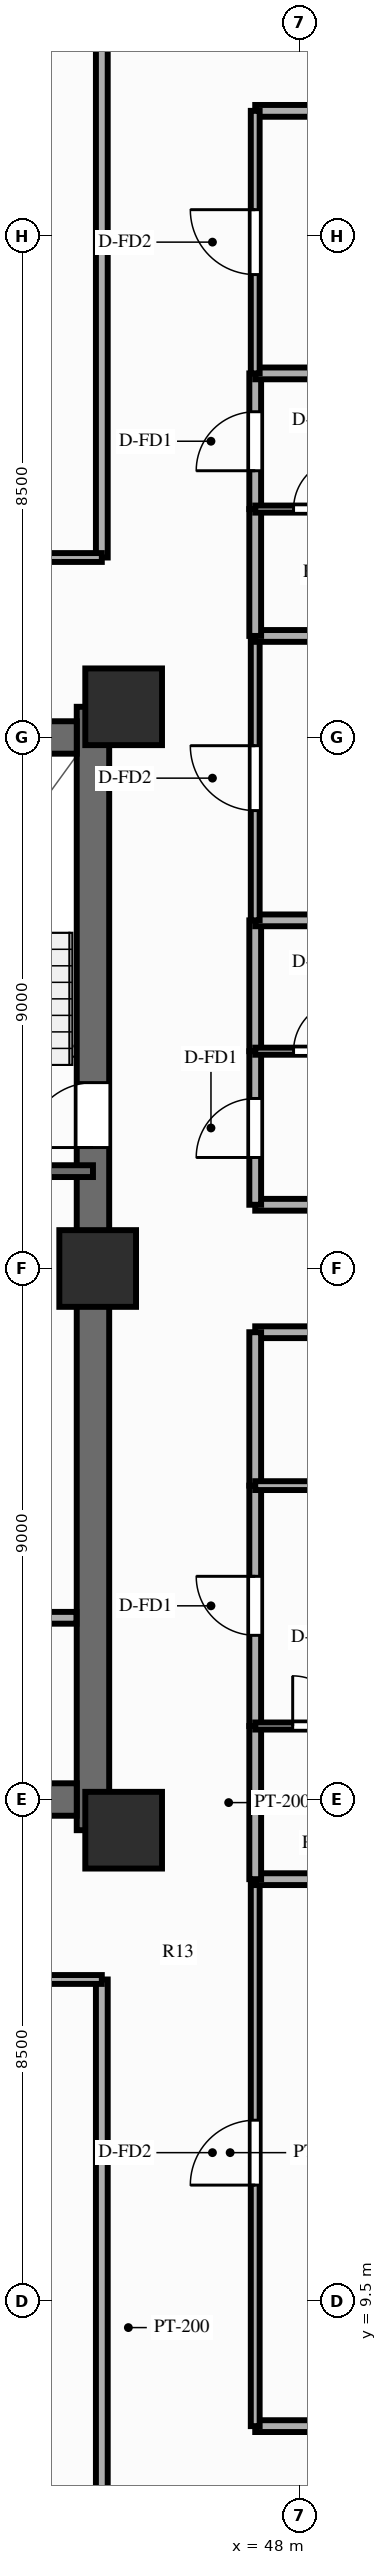
"""IFC4 building model, lengths in metres.
Left out: names, types, materials, properties, quantities, classifications, styles, units other than length and angle.
Written with IfcOpenShell. Run it as: python <this file> out.ifc"""

import sys

from ifc_helpers import new_model, si_unit, direction, frame, frame_2d, origin, origin_2d, place, context, subcontext, project, spatial, rectangle, extrude, source, transform, mapped, element, fill, save


model = new_model("IFC4")
c1 = context("Model", 3, precision=1e-05, world=origin(), true_north=direction((0.0, 1.0)))
c2 = subcontext(c1, "Body", "Model", "MODEL_VIEW")
j1 = project(units=[si_unit("LENGTHUNIT", "METRE"), si_unit("PLANEANGLEUNIT", "RADIAN")], contexts=[c1])
p1 = place(None, origin())
s1 = spatial("IfcSite", under=j1, at=p1, CompositionType="ELEMENT")
p2 = place(p1, origin())
s2 = spatial("IfcBuilding", under=s1, at=p2, CompositionType="ELEMENT")
p3 = place(p2, frame((0.0, 0.0, 126.75)))
s3 = spatial("IfcBuildingStorey", under=s2, at=p3, CompositionType="ELEMENT", Elevation=126.75)
p4 = place(p3, frame((44.5, 17.48, 0.0), z_axis=(0.0, 0.0, 1.0), x_axis=(0.0, 1.0, 0.0)))
e1 = element("IfcWall", 1, at=p4, inside=s3, PredefinedType="SHEAR", context=c2, shape_type="SweptSolid", body=[
    extrude(rectangle(XDim=19.04, YDim=0.55, at=frame_2d((9.52, 0.0))), origin(), (0.0, 0.0, 1.0), 3.0),
])
p5 = place(p4, frame((12.67, 0.0, 0.0), z_axis=(0.0, 0.0, 1.0), x_axis=(-1.0, 0.0, 0.0)))
e2 = element("IfcOpeningElement", 2, at=p5, cuts=e1, PredefinedType="OPENING", context=c2, shape_type="SweptSolid", body=[
    extrude(rectangle(XDim=1.1, YDim=2.15, at=frame_2d((0.55, 1.075))), frame((0.0, 0.287, 0.0), z_axis=(0.0, -1.0, 0.0), x_axis=(1.0, 0.0, 0.0)), (0.0, 0.0, 1.0), 0.574),
])
p6 = place(p3, frame((31.775, 18.0, 0.0), z_axis=(0.0, 0.0, 1.0), x_axis=(1.0, 0.0, 0.0)))
e3 = element("IfcWall", 3, at=p6, inside=s3, PredefinedType="SHEAR", context=c2, shape_type="SweptSolid", body=[
    extrude(rectangle(XDim=12.45, YDim=0.55, at=frame_2d((6.225, 0.0))), origin(), (0.0, 0.0, 1.0), 3.0),
])
p7 = place(p3, frame((31.775, 36.0, 0.0), z_axis=(0.0, 0.0, 1.0), x_axis=(1.0, 0.0, 0.0)))
e4 = element("IfcWall", 4, at=p7, inside=s3, PredefinedType="SHEAR", context=c2, shape_type="SweptSolid", body=[
    extrude(rectangle(XDim=12.45, YDim=0.55, at=frame_2d((6.225, 0.0))), origin(), (0.0, 0.0, 1.0), 3.0),
])
p8 = place(p7, frame((5.175, 0.0, 0.0), z_axis=(0.0, 0.0, 1.0), x_axis=(-1.0, 0.0, 0.0)))
e5 = element("IfcOpeningElement", 5, at=p8, cuts=e4, PredefinedType="OPENING", context=c2, shape_type="SweptSolid", body=[
    extrude(rectangle(XDim=1.4, YDim=2.15, at=frame_2d((0.7, 1.075))), frame((0.0, 0.287, 0.0), z_axis=(0.0, -1.0, 0.0), x_axis=(1.0, 0.0, 0.0)), (0.0, 0.0, 1.0), 0.574),
])
m1 = source(origin(), c2, "Body", "SweptSolid", [
    extrude(rectangle(XDim=1.3, YDim=1.3, at=origin_2d()), origin(), (0.0, 0.0, 1.0), 3.0),
])
for number, where, z_axis, x_axis in (
    (6, (45.02, 17.48, 0.0), (0.0, 0.0, 1.0), (1.0, 0.0, 0.0)),
    (7, (45.02, 36.52, 0.0), (0.0, 0.0, 1.0), (1.0, 0.0, 0.0)),
    (8, (44.58, 27.0, 0.0), (0.0, 0.0, 1.0), (1.0, 0.0, 0.0)),
):
    element("IfcColumn", number, at=place(p3, frame(where, z_axis=z_axis, x_axis=x_axis)), inside=s3, PredefinedType="COLUMN", context=c2, shape_type="MappedRepresentation", body=[
        mapped(m1, transform((0.0, 0.0, 0.0), scale=1.0)),
    ])
p9 = place(p3, frame((42.88, 21.08, 0.0), z_axis=(0.0, 0.0, 1.0), x_axis=(1.0, 0.0, 0.0)))
e9 = element("IfcWall", 9, at=p9, inside=s3, PredefinedType="PARTITIONING", context=c2, shape_type="SweptSolid", body=[
    extrude(rectangle(XDim=1.34, YDim=0.2, at=frame_2d((0.67, 0.0))), origin(), (0.0, 0.0, 1.0), 2.79),
])
p10 = place(p3, frame((40.57, 28.65, 0.0), z_axis=(0.0, 0.0, 1.0), x_axis=(1.0, 0.0, 0.0)))
e10 = element("IfcWall", 10, at=p10, inside=s3, PredefinedType="SOLIDWALL", context=c2, shape_type="SweptSolid", body=[
    extrude(rectangle(XDim=3.93, YDim=0.2, at=frame_2d((1.965, 0.0))), origin(), (0.0, 0.0, 1.0), 2.79),
])
p11 = place(p3, frame((44.65, 14.95, 0.0), z_axis=(0.0, 0.0, 1.0), x_axis=(0.0, -1.0, 0.0)))
e11 = element("IfcWall", 11, at=p11, inside=s3, PredefinedType="PARTITIONING", context=c2, shape_type="SweptSolid", body=[
    extrude(rectangle(XDim=11.8, YDim=0.2, at=frame_2d((5.9, 0.0))), origin(), (0.0, 0.0, 1.0), 2.34),
])
p12 = place(p3, frame((36.25, 14.95, 0.0), z_axis=(0.0, 0.0, 1.0), x_axis=(1.0, 0.0, 0.0)))
e12 = element("IfcWall", 12, at=p12, inside=s3, PredefinedType="PARTITIONING", context=c2, shape_type="SweptSolid", body=[
    extrude(rectangle(XDim=8.4, YDim=0.15, at=frame_2d((4.2, 0.0))), origin(), (0.0, 0.0, 1.0), 2.79),
])
p13 = place(p12, frame((3.367, 0.0, 0.0)))
e13 = element("IfcOpeningElement", 13, at=p13, cuts=e12, PredefinedType="OPENING", context=c2, shape_type="SweptSolid", body=[
    extrude(rectangle(XDim=1.1, YDim=2.15, at=frame_2d((0.55, 1.075))), frame((0.0, 0.087, 0.0), z_axis=(0.0, -1.0, 0.0), x_axis=(1.0, 0.0, 0.0)), (0.0, 0.0, 1.0), 0.174),
])
p14 = place(p3, frame((44.65, 39.05, 0.0), z_axis=(0.0, 0.0, 1.0), x_axis=(0.0, 1.0, 0.0)))
e14 = element("IfcWall", 14, at=p14, inside=s3, PredefinedType="PARTITIONING", context=c2, shape_type="SweptSolid", body=[
    extrude(rectangle(XDim=11.8, YDim=0.2, at=frame_2d((5.9, 0.0))), origin(), (0.0, 0.0, 1.0), 2.34),
])
p15 = place(p3, frame((38.4, 39.05, 0.0), z_axis=(0.0, 0.0, 1.0), x_axis=(1.0, 0.0, 0.0)))
e15 = element("IfcWall", 15, at=p15, inside=s3, PredefinedType="PARTITIONING", context=c2, shape_type="SweptSolid", body=[
    extrude(rectangle(XDim=6.25, YDim=0.15, at=frame_2d((3.125, 0.0))), origin(), (0.0, 0.0, 1.0), 2.79),
])
p16 = place(p15, frame((2.382, 0.0, 0.0)))
e16 = element("IfcOpeningElement", 16, at=p16, cuts=e15, PredefinedType="OPENING", context=c2, shape_type="SweptSolid", body=[
    extrude(rectangle(XDim=1.1, YDim=2.15, at=frame_2d((0.55, 1.075))), frame((0.0, 0.087, 0.0), z_axis=(0.0, -1.0, 0.0), x_axis=(1.0, 0.0, 0.0)), (0.0, 0.0, 1.0), 0.174),
])
for number, where, z_axis, x_axis in (
    (17, (47.25, 7.38, 0.0), (0.0, 0.0, 1.0), (1.0, 0.0, 0.0)),
    (18, (47.25, 25.92, 0.0), (0.0, 0.0, 1.0), (1.0, 0.0, 0.0)),
):
    element("IfcWall", number, at=place(p3, frame(where, z_axis=z_axis, x_axis=x_axis)), inside=s3, PredefinedType="PARTITIONING", context=c2, shape_type="SweptSolid", body=[
        extrude(rectangle(XDim=16.6, YDim=0.2, at=frame_2d((8.3, 0.0))), origin(), (0.0, 0.0, 1.0), 2.79),
    ])
p17 = place(p3, frame((47.25, 7.38, 0.0), z_axis=(0.0, 0.0, 1.0), x_axis=(0.0, 1.0, 0.0)))
e19 = element("IfcWall", 19, at=p17, inside=s3, PredefinedType="PARTITIONING", context=c2, shape_type="SweptSolid", body=[
    extrude(rectangle(XDim=9.27, YDim=0.15, at=frame_2d((4.635, 0.0))), origin(), (0.0, 0.0, 1.0), 2.79),
])
p18 = place(p17, frame((4.085, 0.0, 0.0)))
e20 = element("IfcOpeningElement", 20, at=p18, cuts=e19, PredefinedType="OPENING", context=c2, shape_type="SweptSolid", body=[
    extrude(rectangle(XDim=1.1, YDim=2.15, at=frame_2d((0.55, 1.075))), frame((0.0, 0.087, 0.0), z_axis=(0.0, -1.0, 0.0), x_axis=(1.0, 0.0, 0.0)), (0.0, 0.0, 1.0), 0.174),
])
p19 = place(p3, frame((47.25, 16.65, 0.0), z_axis=(0.0, 0.0, 1.0), x_axis=(1.0, 0.0, 0.0)))
e21 = element("IfcWall", 21, at=p19, inside=s3, PredefinedType="PARTITIONING", context=c2, shape_type="SweptSolid", body=[
    extrude(rectangle(XDim=16.6, YDim=0.2, at=frame_2d((8.3, 0.0))), origin(), (0.0, 0.0, 1.0), 2.79),
])
p20 = place(p3, frame((47.25, 16.65, 0.0), z_axis=(0.0, 0.0, 1.0), x_axis=(0.0, 1.0, 0.0)))
e22 = element("IfcWall", 22, at=p20, inside=s3, PredefinedType="PARTITIONING", context=c2, shape_type="SweptSolid", body=[
    extrude(rectangle(XDim=2.596, YDim=0.2, at=frame_2d((1.298, 0.0))), origin(), (0.0, 0.0, 1.0), 2.79),
])
p21 = place(p3, frame((47.25, 19.246, 0.0), z_axis=(0.0, 0.0, 1.0), x_axis=(0.0, 1.0, 0.0)))
e23 = element("IfcWall", 23, at=p21, inside=s3, PredefinedType="PARTITIONING", context=c2, shape_type="SweptSolid", body=[
    extrude(rectangle(XDim=4.074, YDim=0.2, at=frame_2d((2.037, 0.0))), origin(), (0.0, 0.0, 1.0), 2.79),
])
p22 = place(p21, frame((1.537, 0.0, 0.0)))
e24 = element("IfcOpeningElement", 24, at=p22, cuts=e23, PredefinedType="OPENING", context=c2, shape_type="SweptSolid", body=[
    extrude(rectangle(XDim=1.0, YDim=2.15, at=frame_2d((0.5, 1.075))), frame((0.0, 0.112, 0.0), z_axis=(0.0, -1.0, 0.0), x_axis=(1.0, 0.0, 0.0)), (0.0, 0.0, 1.0), 0.224),
])
p23 = place(p3, frame((47.25, 23.32, 0.0), z_axis=(0.0, 0.0, 1.0), x_axis=(0.0, 1.0, 0.0)))
e25 = element("IfcWall", 25, at=p23, inside=s3, PredefinedType="PARTITIONING", context=c2, shape_type="SweptSolid", body=[
    extrude(rectangle(XDim=2.6, YDim=0.2, at=frame_2d((1.3, 0.0))), origin(), (0.0, 0.0, 1.0), 2.79),
])
p24 = place(p3, frame((47.25, 19.246, 0.0), z_axis=(0.0, 0.0, 1.0), x_axis=(1.0, 0.0, 0.0)))
e26 = element("IfcWall", 26, at=p24, inside=s3, PredefinedType="PARTITIONING", context=c2, shape_type="SweptSolid", body=[
    extrude(rectangle(XDim=2.12, YDim=0.12, at=frame_2d((1.06, 0.0))), origin(), (0.0, 0.0, 1.0), 2.79),
])
p25 = place(p24, frame((0.635, 0.0, 0.0)))
e27 = element("IfcOpeningElement", 27, at=p25, cuts=e26, PredefinedType="OPENING", context=c2, shape_type="SweptSolid", body=[
    extrude(rectangle(XDim=0.85, YDim=2.05, at=frame_2d((0.425, 1.025))), frame((0.0, 0.072, 0.0), z_axis=(0.0, -1.0, 0.0), x_axis=(1.0, 0.0, 0.0)), (0.0, 0.0, 1.0), 0.144),
])
p26 = place(p3, frame((47.25, 23.32, 0.0), z_axis=(0.0, 0.0, 1.0), x_axis=(1.0, 0.0, 0.0)))
e28 = element("IfcWall", 28, at=p26, inside=s3, PredefinedType="PARTITIONING", context=c2, shape_type="SweptSolid", body=[
    extrude(rectangle(XDim=3.0, YDim=0.15, at=frame_2d((1.5, 0.0))), origin(), (0.0, 0.0, 1.0), 2.79),
])
p27 = place(p26, frame((1.05, 0.0, 0.0)))
e29 = element("IfcOpeningElement", 29, at=p27, cuts=e28, PredefinedType="OPENING", context=c2, shape_type="SweptSolid", body=[
    extrude(rectangle(XDim=0.9, YDim=2.1, at=frame_2d((0.45, 1.05))), frame((0.0, 0.087, 0.0), z_axis=(0.0, -1.0, 0.0), x_axis=(1.0, 0.0, 0.0)), (0.0, 0.0, 1.0), 0.174),
])
for number, where, z_axis, x_axis in (
    (30, (47.25, 28.08, 0.0), (0.0, 0.0, 1.0), (1.0, 0.0, 0.0)),
    (31, (47.25, 46.62, 0.0), (0.0, 0.0, 1.0), (1.0, 0.0, 0.0)),
):
    element("IfcWall", number, at=place(p3, frame(where, z_axis=z_axis, x_axis=x_axis)), inside=s3, PredefinedType="PARTITIONING", context=c2, shape_type="SweptSolid", body=[
        extrude(rectangle(XDim=16.6, YDim=0.2, at=frame_2d((8.3, 0.0))), origin(), (0.0, 0.0, 1.0), 2.79),
    ])
p28 = place(p3, frame((47.25, 28.08, 0.0), z_axis=(0.0, 0.0, 1.0), x_axis=(0.0, 1.0, 0.0)))
e32 = element("IfcWall", 32, at=p28, inside=s3, PredefinedType="PARTITIONING", context=c2, shape_type="SweptSolid", body=[
    extrude(rectangle(XDim=2.603, YDim=0.2, at=frame_2d((1.302, 0.0))), origin(), (0.0, 0.0, 1.0), 2.79),
])
p29 = place(p28, frame((0.802, 0.0, 0.0)))
e33 = element("IfcOpeningElement", 33, at=p29, cuts=e32, PredefinedType="OPENING", context=c2, shape_type="SweptSolid", body=[
    extrude(rectangle(XDim=1.0, YDim=2.15, at=frame_2d((0.5, 1.075))), frame((0.0, 0.112, 0.0), z_axis=(0.0, -1.0, 0.0), x_axis=(1.0, 0.0, 0.0)), (0.0, 0.0, 1.0), 0.224),
])
p30 = place(p3, frame((47.25, 30.683, 0.0), z_axis=(0.0, 0.0, 1.0), x_axis=(0.0, 1.0, 0.0)))
e34 = element("IfcWall", 34, at=p30, inside=s3, PredefinedType="PARTITIONING", context=c2, shape_type="SweptSolid", body=[
    extrude(rectangle(XDim=2.217, YDim=0.2, at=frame_2d((1.109, 0.0))), origin(), (0.0, 0.0, 1.0), 2.79),
])
p31 = place(p3, frame((47.25, 30.683, 0.0), z_axis=(0.0, 0.0, 1.0), x_axis=(1.0, 0.0, 0.0)))
e35 = element("IfcWall", 35, at=p31, inside=s3, PredefinedType="PARTITIONING", context=c2, shape_type="SweptSolid", body=[
    extrude(rectangle(XDim=2.15, YDim=0.12, at=frame_2d((1.075, 0.0))), origin(), (0.0, 0.0, 1.0), 2.79),
])
p32 = place(p31, frame((0.65, 0.0, 0.0)))
e36 = element("IfcOpeningElement", 36, at=p32, cuts=e35, PredefinedType="OPENING", context=c2, shape_type="SweptSolid", body=[
    extrude(rectangle(XDim=0.85, YDim=2.05, at=frame_2d((0.425, 1.025))), frame((0.0, 0.072, 0.0), z_axis=(0.0, -1.0, 0.0), x_axis=(1.0, 0.0, 0.0)), (0.0, 0.0, 1.0), 0.144),
])
p33 = place(p3, frame((47.25, 32.9, 0.0), z_axis=(0.0, 0.0, 1.0), x_axis=(1.0, 0.0, 0.0)))
e37 = element("IfcWall", 37, at=p33, inside=s3, PredefinedType="PARTITIONING", context=c2, shape_type="SweptSolid", body=[
    extrude(rectangle(XDim=16.6, YDim=0.2, at=frame_2d((8.3, 0.0))), origin(), (0.0, 0.0, 1.0), 2.79),
])
p34 = place(p3, frame((47.25, 32.9, 0.0), z_axis=(0.0, 0.0, 1.0), x_axis=(0.0, 1.0, 0.0)))
e38 = element("IfcWall", 38, at=p34, inside=s3, PredefinedType="PARTITIONING", context=c2, shape_type="SweptSolid", body=[
    extrude(rectangle(XDim=4.82, YDim=0.15, at=frame_2d((2.41, 0.0))), origin(), (0.0, 0.0, 1.0), 2.79),
])
p35 = place(p34, frame((1.86, 0.0, 0.0)))
e39 = element("IfcOpeningElement", 39, at=p35, cuts=e38, PredefinedType="OPENING", context=c2, shape_type="SweptSolid", body=[
    extrude(rectangle(XDim=1.1, YDim=2.15, at=frame_2d((0.55, 1.075))), frame((0.0, 0.087, 0.0), z_axis=(0.0, -1.0, 0.0), x_axis=(1.0, 0.0, 0.0)), (0.0, 0.0, 1.0), 0.174),
])
p36 = place(p3, frame((47.25, 37.721, 0.0), z_axis=(0.0, 0.0, 1.0), x_axis=(1.0, 0.0, 0.0)))
e40 = element("IfcWall", 40, at=p36, inside=s3, PredefinedType="PARTITIONING", context=c2, shape_type="SweptSolid", body=[
    extrude(rectangle(XDim=16.6, YDim=0.2, at=frame_2d((8.3, 0.0))), origin(), (0.0, 0.0, 1.0), 2.79),
])
p37 = place(p3, frame((47.25, 37.721, 0.0), z_axis=(0.0, 0.0, 1.0), x_axis=(0.0, 1.0, 0.0)))
e41 = element("IfcWall", 41, at=p37, inside=s3, PredefinedType="PARTITIONING", context=c2, shape_type="SweptSolid", body=[
    extrude(rectangle(XDim=2.15, YDim=0.2, at=frame_2d((1.075, 0.0))), origin(), (0.0, 0.0, 1.0), 2.79),
])
p38 = place(p3, frame((47.25, 39.871, 0.0), z_axis=(0.0, 0.0, 1.0), x_axis=(0.0, 1.0, 0.0)))
e42 = element("IfcWall", 42, at=p38, inside=s3, PredefinedType="PARTITIONING", context=c2, shape_type="SweptSolid", body=[
    extrude(rectangle(XDim=2.3, YDim=0.2, at=frame_2d((1.15, 0.0))), origin(), (0.0, 0.0, 1.0), 2.79),
])
p39 = place(p38, frame((0.65, 0.0, 0.0)))
e43 = element("IfcOpeningElement", 43, at=p39, cuts=e42, PredefinedType="OPENING", context=c2, shape_type="SweptSolid", body=[
    extrude(rectangle(XDim=1.0, YDim=2.15, at=frame_2d((0.5, 1.075))), frame((0.0, 0.112, 0.0), z_axis=(0.0, -1.0, 0.0), x_axis=(1.0, 0.0, 0.0)), (0.0, 0.0, 1.0), 0.224),
])
p40 = place(p3, frame((47.25, 39.871, 0.0), z_axis=(0.0, 0.0, 1.0), x_axis=(1.0, 0.0, 0.0)))
e44 = element("IfcWall", 44, at=p40, inside=s3, PredefinedType="PARTITIONING", context=c2, shape_type="SweptSolid", body=[
    extrude(rectangle(XDim=2.15, YDim=0.12, at=frame_2d((1.075, 0.0))), origin(), (0.0, 0.0, 1.0), 2.79),
])
p41 = place(p40, frame((0.65, 0.0, 0.0)))
e45 = element("IfcOpeningElement", 45, at=p41, cuts=e44, PredefinedType="OPENING", context=c2, shape_type="SweptSolid", body=[
    extrude(rectangle(XDim=0.85, YDim=2.05, at=frame_2d((0.425, 1.025))), frame((0.0, 0.072, 0.0), z_axis=(0.0, -1.0, 0.0), x_axis=(1.0, 0.0, 0.0)), (0.0, 0.0, 1.0), 0.144),
])
p42 = place(p3, frame((47.25, 42.17, 0.0), z_axis=(0.0, 0.0, 1.0), x_axis=(1.0, 0.0, 0.0)))
e46 = element("IfcWall", 46, at=p42, inside=s3, PredefinedType="PARTITIONING", context=c2, shape_type="SweptSolid", body=[
    extrude(rectangle(XDim=16.6, YDim=0.2, at=frame_2d((8.3, 0.0))), origin(), (0.0, 0.0, 1.0), 2.79),
])
p43 = place(p3, frame((47.25, 42.17, 0.0), z_axis=(0.0, 0.0, 1.0), x_axis=(0.0, 1.0, 0.0)))
e47 = element("IfcWall", 47, at=p43, inside=s3, PredefinedType="PARTITIONING", context=c2, shape_type="SweptSolid", body=[
    extrude(rectangle(XDim=4.45, YDim=0.15, at=frame_2d((2.225, 0.0))), origin(), (0.0, 0.0, 1.0), 2.79),
])
p44 = place(p43, frame((1.675, 0.0, 0.0)))
e48 = element("IfcOpeningElement", 48, at=p44, cuts=e47, PredefinedType="OPENING", context=c2, shape_type="SweptSolid", body=[
    extrude(rectangle(XDim=1.1, YDim=2.15, at=frame_2d((0.55, 1.075))), frame((0.0, 0.087, 0.0), z_axis=(0.0, -1.0, 0.0), x_axis=(1.0, 0.0, 0.0)), (0.0, 0.0, 1.0), 0.174),
])
m2 = source(origin(), c2, "Body", "SweptSolid", [
    extrude(rectangle(XDim=1.1, YDim=2.15, at=frame_2d((0.55, 1.075))), frame((0.0, 0.025, 0.0), z_axis=(0.0, -1.0, 0.0), x_axis=(1.0, 0.0, 0.0)), (0.0, 0.0, 1.0), 0.05),
])
p45 = place(p5, origin())
e49 = element("IfcDoor", 49, at=p45, inside=s3, OperationType="SINGLE_SWING_RIGHT", PredefinedType="DOOR", context=c2, shape_type="MappedRepresentation", body=[
    mapped(m2, transform((0.0, 0.0, 0.0), scale=1.0)),
])
fill(e2, e49)
p46 = place(p18, origin())
e50 = element("IfcDoor", 50, at=p46, inside=s3, OperationType="SINGLE_SWING_LEFT", PredefinedType="DOOR", context=c2, shape_type="MappedRepresentation", body=[
    mapped(m2, transform((0.0, 0.0, 0.0), scale=1.0)),
])
fill(e20, e50)
m3 = source(origin(), c2, "Body", "SweptSolid", [
    extrude(rectangle(XDim=1.0, YDim=2.15, at=frame_2d((0.5, 1.075))), frame((0.0, 0.025, 0.0), z_axis=(0.0, -1.0, 0.0), x_axis=(1.0, 0.0, 0.0)), (0.0, 0.0, 1.0), 0.05),
])
p47 = place(p22, origin())
e51 = element("IfcDoor", 51, at=p47, inside=s3, OperationType="SINGLE_SWING_RIGHT", PredefinedType="DOOR", context=c2, shape_type="MappedRepresentation", body=[
    mapped(m3, transform((0.0, 0.0, 0.0), scale=1.0)),
])
fill(e24, e51)
m4 = source(origin(), c2, "Body", "SweptSolid", [
    extrude(rectangle(XDim=0.85, YDim=2.05, at=frame_2d((0.425, 1.025))), frame((0.0, 0.025, 0.0), z_axis=(0.0, -1.0, 0.0), x_axis=(1.0, 0.0, 0.0)), (0.0, 0.0, 1.0), 0.05),
])
p48 = place(p25, origin())
e52 = element("IfcDoor", 52, at=p48, inside=s3, OperationType="SINGLE_SWING_LEFT", PredefinedType="DOOR", context=c2, shape_type="MappedRepresentation", body=[
    mapped(m4, transform((0.0, 0.0, 0.0), scale=1.0)),
])
fill(e27, e52)
p49 = place(p29, origin())
e53 = element("IfcDoor", 53, at=p49, inside=s3, OperationType="SINGLE_SWING_LEFT", PredefinedType="DOOR", context=c2, shape_type="MappedRepresentation", body=[
    mapped(m3, transform((0.0, 0.0, 0.0), scale=1.0)),
])
fill(e33, e53)
p50 = place(p32, origin())
e54 = element("IfcDoor", 54, at=p50, inside=s3, OperationType="SINGLE_SWING_RIGHT", PredefinedType="DOOR", context=c2, shape_type="MappedRepresentation", body=[
    mapped(m4, transform((0.0, 0.0, 0.0), scale=1.0)),
])
fill(e36, e54)
p51 = place(p35, origin())
e55 = element("IfcDoor", 55, at=p51, inside=s3, OperationType="SINGLE_SWING_RIGHT", PredefinedType="DOOR", context=c2, shape_type="MappedRepresentation", body=[
    mapped(m2, transform((0.0, 0.0, 0.0), scale=1.0)),
])
fill(e39, e55)
p52 = place(p39, origin())
e56 = element("IfcDoor", 56, at=p52, inside=s3, OperationType="SINGLE_SWING_LEFT", PredefinedType="DOOR", context=c2, shape_type="MappedRepresentation", body=[
    mapped(m3, transform((0.0, 0.0, 0.0), scale=1.0)),
])
fill(e43, e56)
p53 = place(p41, origin())
e57 = element("IfcDoor", 57, at=p53, inside=s3, OperationType="SINGLE_SWING_RIGHT", PredefinedType="DOOR", context=c2, shape_type="MappedRepresentation", body=[
    mapped(m4, transform((0.0, 0.0, 0.0), scale=1.0)),
])
fill(e45, e57)
p54 = place(p44, origin())
e58 = element("IfcDoor", 58, at=p54, inside=s3, OperationType="SINGLE_SWING_RIGHT", PredefinedType="DOOR", context=c2, shape_type="MappedRepresentation", body=[
    mapped(m2, transform((0.0, 0.0, 0.0), scale=1.0)),
])
fill(e48, e58)
save(model, sys.argv[1])
